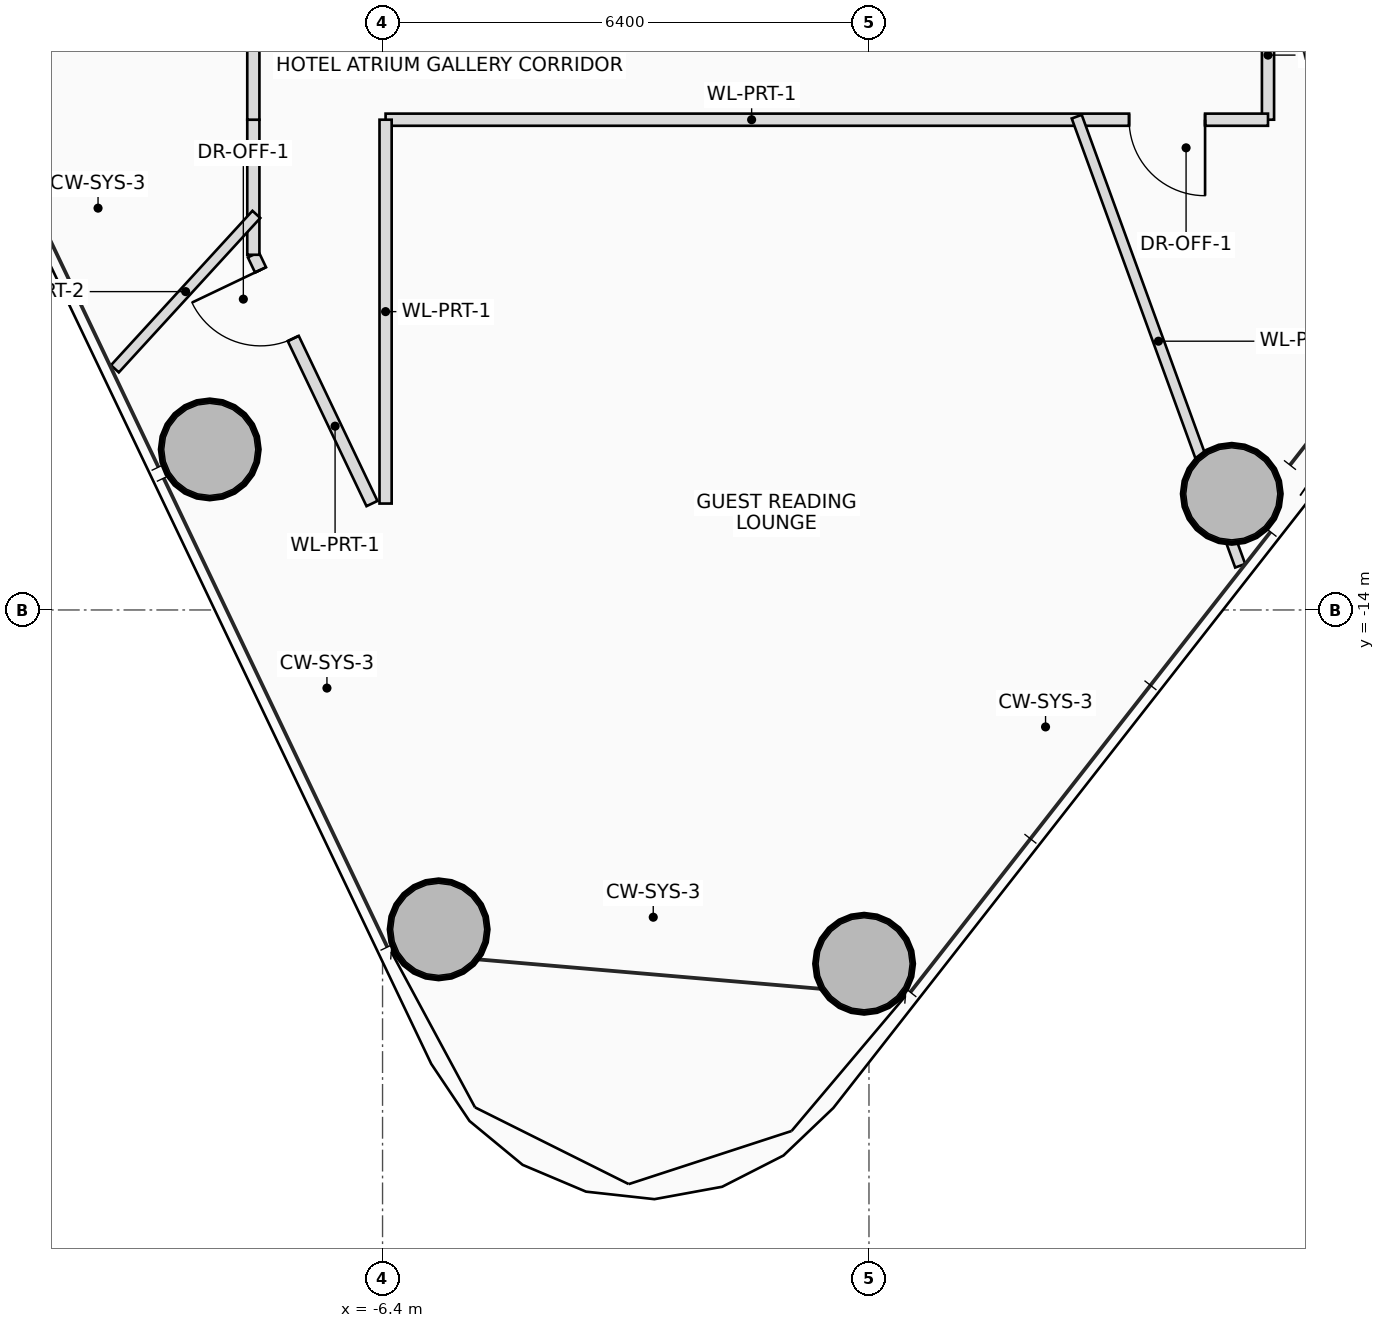
"""IFC4 building model, lengths in metres.
Left out: names, types, materials, properties, quantities, classifications, styles, units other than length and angle.
Written with IfcOpenShell. Run it as: python <this file> out.ifc"""

import sys

from ifc_helpers import new_model, si_unit, direction, frame, frame_2d, origin, origin_2d, place, context, subcontext, project, spatial, rectangle, hollow_circle, extrude, source, transform, mapped, element, fill, save


model = new_model("IFC4")
c1 = context("Model", 3, precision=1e-05, world=origin(), true_north=direction((0.0, 1.0)))
c2 = subcontext(c1, "Body", "Model", "MODEL_VIEW")
j1 = project(units=[si_unit("LENGTHUNIT", "METRE"), si_unit("PLANEANGLEUNIT", "RADIAN")], contexts=[c1])
p1 = place(None, origin())
s1 = spatial("IfcSite", under=j1, at=p1, CompositionType="ELEMENT")
p2 = place(p1, origin())
s2 = spatial("IfcBuilding", under=s1, at=p2, CompositionType="ELEMENT")
p3 = place(p2, frame((0.0, 0.0, 129.5)))
s3 = spatial("IfcBuildingStorey", under=s2, at=p3, CompositionType="ELEMENT", Elevation=129.5)
m1 = source(origin(), c2, "Body", "SweptSolid", [
    extrude(hollow_circle(Radius=0.65, WallThickness=0.045, at=origin_2d()), origin(), (0.0, 0.0, 1.0), 3.45),
])
for number, where, z_axis, x_axis in (
    (1, (-0.064, -18.655, 0.0), (0.0, 0.0, 1.0), (1.0, 0.0, 0.0)),
    (2, (4.773, -12.472, 0.0), (0.0, 0.0, 1.0), (1.0, 0.0, 0.0)),
    (3, (-8.674, -11.888, 0.0), (0.0, 0.0, 1.0), (1.0, 0.0, 0.0)),
    (4, (-5.662, -18.202, 0.0), (0.0, 0.0, 1.0), (1.0, 0.0, 0.0)),
):
    element("IfcColumn", number, at=place(p3, frame(where, z_axis=z_axis, x_axis=x_axis)), inside=s3, PredefinedType="COLUMN", context=c2, shape_type="MappedRepresentation", body=[
        mapped(m1, transform((0.0, 0.0, 0.0), scale=1.0)),
    ])
p4 = place(p3, frame((-6.539, -12.6, 0.0), z_axis=(0.0, 0.0, 1.0), x_axis=(-0.430521464151, 0.902580339308, 0.0)))
e5 = element("IfcWall", 5, at=p4, inside=s3, PredefinedType="PARTITIONING", context=c2, shape_type="SweptSolid", body=[
    extrude(rectangle(XDim=3.626, YDim=0.16, at=frame_2d((1.813, 0.0))), origin(), (0.0, 0.0, 1.0), 2.605),
])
p5 = place(p4, frame((2.406, 0.0, 0.0)))
e6 = element("IfcOpeningElement", 6, at=p5, cuts=e5, PredefinedType="OPENING", context=c2, shape_type="SweptSolid", body=[
    extrude(rectangle(XDim=1.0, YDim=2.25, at=frame_2d((0.5, 1.125))), frame((0.0, 0.09, 0.0), z_axis=(0.0, -1.0, 0.0), x_axis=(1.0, 0.0, 0.0)), (0.0, 0.0, 1.0), 0.18),
])
p6 = place(p3, frame((-8.1, -9.327, 0.0), z_axis=(0.0, 0.0, 1.0), x_axis=(0.0, 1.0, 0.0)))
e7 = element("IfcWall", 7, at=p6, inside=s3, PredefinedType="PARTITIONING", context=c2, shape_type="SweptSolid", body=[
    extrude(rectangle(XDim=1.777, YDim=0.16, at=frame_2d((0.888, 0.0))), origin(), (0.0, 0.0, 1.0), 3.25),
])
p7 = place(p3, frame((-8.1, -7.55, 0.0), z_axis=(0.0, 0.0, 1.0), x_axis=(0.0, 1.0, 0.0)))
e8 = element("IfcWall", 8, at=p7, inside=s3, PredefinedType="PARTITIONING", context=c2, shape_type="SweptSolid", body=[
    extrude(rectangle(XDim=15.1, YDim=0.16, at=frame_2d((7.55, 0.0))), origin(), (0.0, 0.0, 1.0), 2.605),
])
p8 = place(p7, frame((2.989, 0.0, 0.0)))
e9 = element("IfcOpeningElement", 9, at=p8, cuts=e8, PredefinedType="OPENING", context=c2, shape_type="SweptSolid", body=[
    extrude(rectangle(XDim=0.9, YDim=2.05, at=frame_2d((0.45, 1.025))), frame((0.0, 0.09, 0.0), z_axis=(0.0, -1.0, 0.0), x_axis=(1.0, 0.0, 0.0)), (0.0, 0.0, 1.0), 0.18),
])
p9 = place(p7, frame((10.301, 0.0, 0.0)))
e10 = element("IfcOpeningElement", 10, at=p9, cuts=e8, PredefinedType="OPENING", context=c2, shape_type="SweptSolid", body=[
    extrude(rectangle(XDim=1.0, YDim=2.25, at=frame_2d((0.5, 1.125))), frame((0.0, 0.09, 0.0), z_axis=(0.0, -1.0, 0.0), x_axis=(1.0, 0.0, 0.0)), (0.0, 0.0, 1.0), 0.18),
])
p10 = place(p3, frame((5.25, -5.85, 0.0), z_axis=(0.0, 0.0, 1.0), x_axis=(0.0, -1.0, 0.0)))
e11 = element("IfcWall", 11, at=p10, inside=s3, PredefinedType="PARTITIONING", context=c2, shape_type="SweptSolid", body=[
    extrude(rectangle(XDim=1.7, YDim=0.16, at=frame_2d((0.85, 0.0))), origin(), (0.0, 0.0, 1.0), 3.25),
])
p11 = place(p3, frame((5.25, -7.55, 0.0), z_axis=(0.0, 0.0, 1.0), x_axis=(-1.0, 0.0, 0.0)))
e12 = element("IfcWall", 12, at=p11, inside=s3, PredefinedType="PARTITIONING", context=c2, shape_type="SweptSolid", body=[
    extrude(rectangle(XDim=11.61, YDim=0.16, at=frame_2d((5.805, 0.0))), origin(), (0.0, 0.0, 1.0), 2.605),
])
p12 = place(p11, frame((0.828, 0.0, 0.0)))
e13 = element("IfcOpeningElement", 13, at=p12, cuts=e12, PredefinedType="OPENING", context=c2, shape_type="SweptSolid", body=[
    extrude(rectangle(XDim=1.0, YDim=2.25, at=frame_2d((0.5, 1.125))), frame((0.0, 0.09, 0.0), z_axis=(0.0, -1.0, 0.0), x_axis=(1.0, 0.0, 0.0)), (0.0, 0.0, 1.0), 0.18),
])
p13 = place(p3, frame((-6.36, -7.55, 0.0), z_axis=(0.0, 0.0, 1.0), x_axis=(0.0, -1.0, 0.0)))
e14 = element("IfcWall", 14, at=p13, inside=s3, PredefinedType="PARTITIONING", context=c2, shape_type="SweptSolid", body=[
    extrude(rectangle(XDim=5.05, YDim=0.16, at=frame_2d((2.525, 0.0))), origin(), (0.0, 0.0, 1.0), 3.25),
])
p14 = place(p3, frame((-8.06, -8.796, 0.0), z_axis=(0.0, 0.0, 1.0), x_axis=(-0.67555207399, -0.737312278026, 0.0)))
e15 = element("IfcWall", 15, at=p14, inside=s3, PredefinedType="PARTITIONING", context=c2, shape_type="SweptSolid", body=[
    extrude(rectangle(XDim=2.755, YDim=0.14, at=frame_2d((1.378, 0.0))), origin(), (0.0, 0.0, 1.0), 2.765),
])
p15 = place(p3, frame((2.733, -7.51, 0.0), z_axis=(0.0, 0.0, 1.0), x_axis=(0.342029891784, -0.93968907258, 0.0)))
e16 = element("IfcWall", 16, at=p15, inside=s3, PredefinedType="PARTITIONING", context=c2, shape_type="SweptSolid", body=[
    extrude(rectangle(XDim=6.287, YDim=0.14, at=frame_2d((3.144, 0.0))), origin(), (0.0, 0.0, 1.0), 2.805),
])
p16 = place(p5, origin())
e17 = element("IfcDoor", 17, at=p16, inside=s3, OperationType="SINGLE_SWING_RIGHT", PredefinedType="DOOR", context=c2, shape_type="SweptSolid", body=[
    extrude(rectangle(XDim=1.0, YDim=2.25, at=frame_2d((0.5, 1.125))), frame((0.0, 0.025, 0.0), z_axis=(0.0, -1.0, 0.0), x_axis=(1.0, 0.0, 0.0)), (0.0, 0.0, 1.0), 0.05),
])
fill(e6, e17)
p17 = place(p12, origin())
e18 = element("IfcDoor", 18, at=p17, inside=s3, OperationType="SINGLE_SWING_LEFT", PredefinedType="DOOR", context=c2, shape_type="SweptSolid", body=[
    extrude(rectangle(XDim=1.0, YDim=2.25, at=frame_2d((0.5, 1.125))), frame((0.0, 0.025, 0.0), z_axis=(0.0, -1.0, 0.0), x_axis=(1.0, 0.0, 0.0)), (0.0, 0.0, 1.0), 0.05),
])
fill(e13, e18)
save(model, sys.argv[1])
